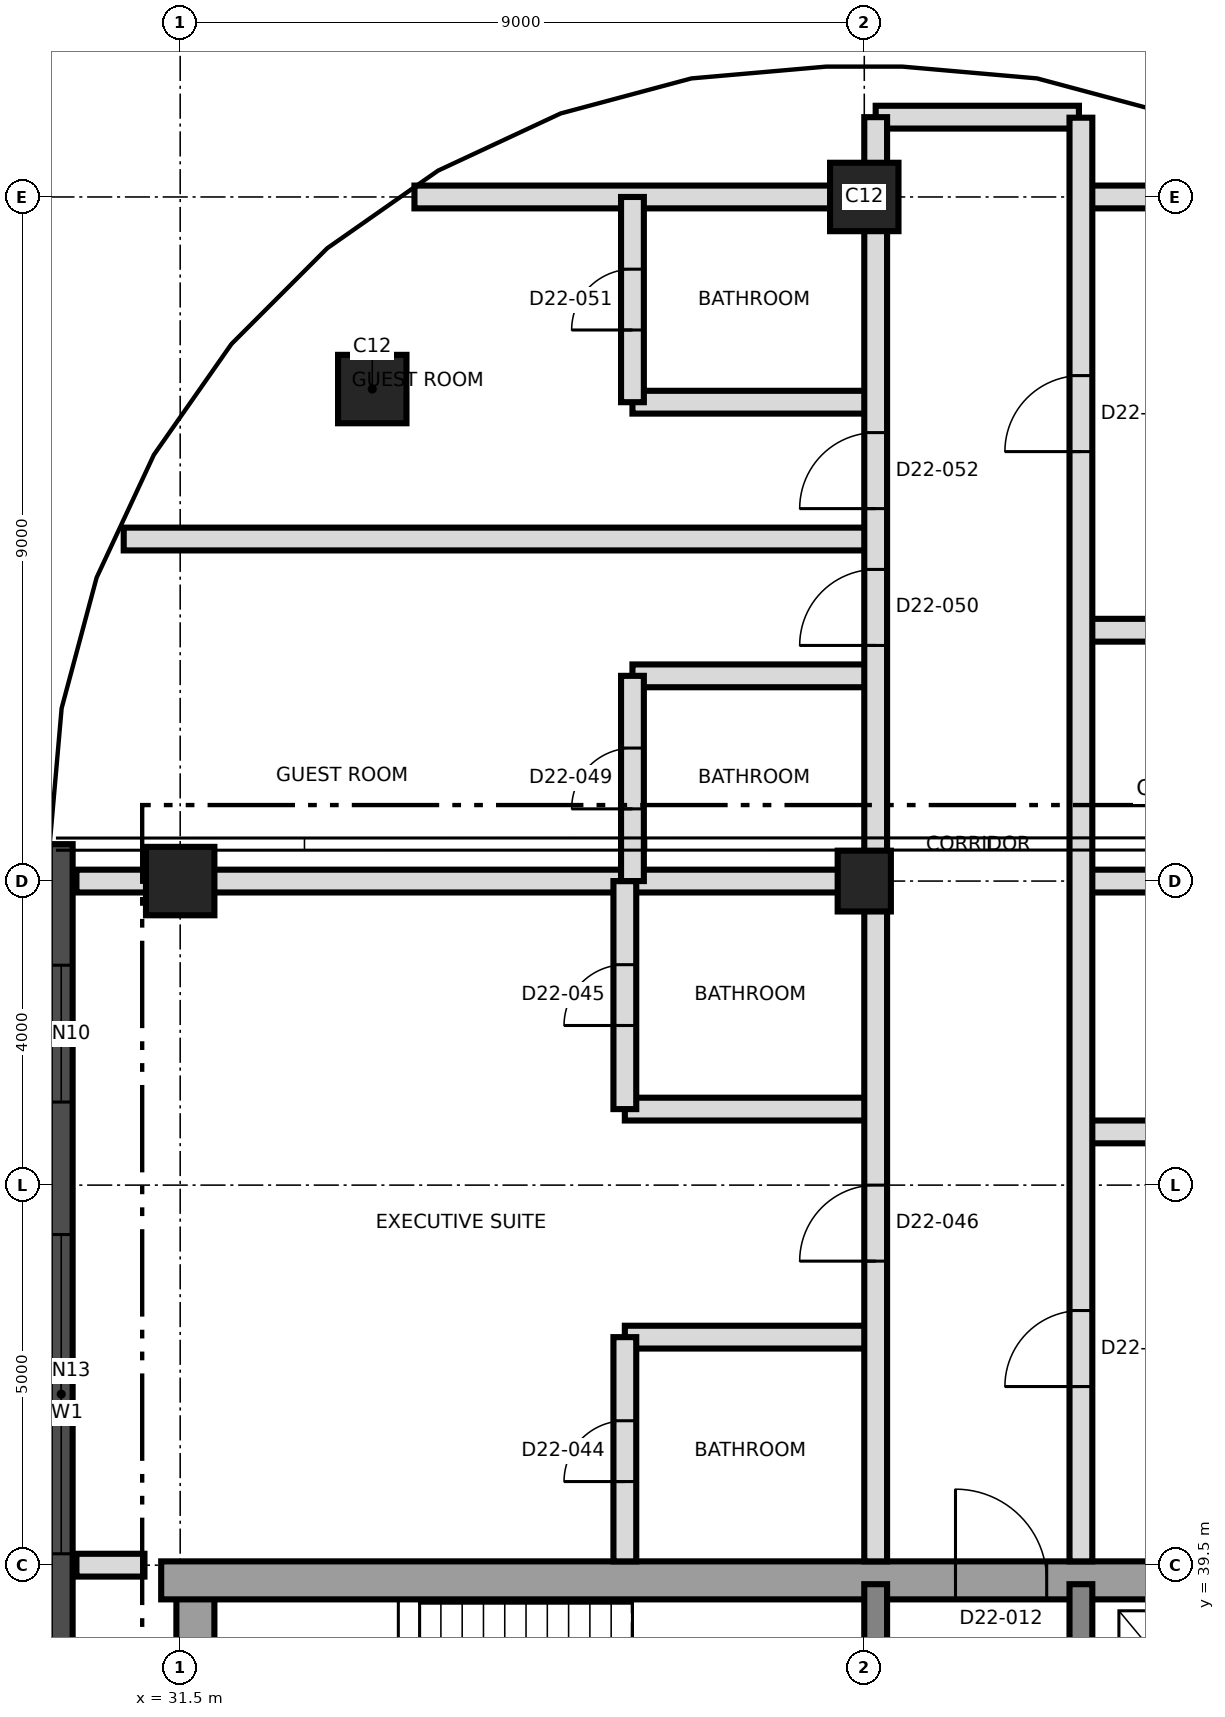
"""IFC4 building model, lengths in metres.
Left out: names, types, materials, properties, quantities, classifications, styles, units other than length and angle.
Written with IfcOpenShell. Run it as: python <this file> out.ifc"""

import sys

from ifc_helpers import new_model, si_unit, direction, frame, frame_2d, origin, origin_2d, place, context, subcontext, project, spatial, rectangle, extrude, element, fill, save


model = new_model("IFC4")
c1 = context("Model", 3, precision=1e-05, world=origin(), true_north=direction((0.0, 1.0)))
c2 = subcontext(c1, "Body", "Model", "MODEL_VIEW")
j1 = project(units=[si_unit("LENGTHUNIT", "METRE"), si_unit("PLANEANGLEUNIT", "RADIAN")], contexts=[c1])
p1 = place(None, origin())
s1 = spatial("IfcSite", under=j1, at=p1, CompositionType="ELEMENT")
p2 = place(p1, origin())
s2 = spatial("IfcBuilding", under=s1, at=p2, CompositionType="ELEMENT")
p3 = place(p2, frame((0.0, 0.0, 203.2)))
s3 = spatial("IfcBuildingStorey", under=s2, at=p3, CompositionType="ELEMENT", Elevation=203.2)
p4 = place(p3, frame((31.7, 21.75, 0.0), z_axis=(0.0, 0.0, 1.0), x_axis=(0.0, 1.0, 0.0)))
e1 = element("IfcWall", 1, at=p4, inside=s3, PredefinedType="SHEAR", context=c2, shape_type="SweptSolid", body=[
    extrude(rectangle(XDim=17.5, YDim=0.5, at=frame_2d((8.75, 0.0))), origin(), (0.0, 0.0, 1.0), 3.7),
])
p5 = place(p3, frame((31.25, 39.3, 0.0), z_axis=(0.0, 0.0, 1.0), x_axis=(1.0, 0.0, 0.0)))
e2 = element("IfcWall", 2, at=p5, inside=s3, PredefinedType="SHEAR", context=c2, shape_type="SweptSolid", body=[
    extrude(rectangle(XDim=27.0, YDim=0.5, at=frame_2d((13.5, 0.0))), origin(), (0.0, 0.0, 1.0), 3.7),
])
p6 = place(p5, frame((10.45, 0.0, 0.0)))
e3 = element("IfcOpeningElement", 3, at=p6, cuts=e2, PredefinedType="OPENING", context=c2, shape_type="SweptSolid", body=[
    extrude(rectangle(XDim=1.2, YDim=2.1, at=frame_2d((0.6, 1.05))), frame((0.0, 0.26, 0.0), z_axis=(0.0, -1.0, 0.0), x_axis=(1.0, 0.0, 0.0)), (0.0, 0.0, 1.0), 0.52),
])
for number, where, z_axis, x_axis in (
    (4, (40.65, 33.5, 0.0), (0.0, 0.0, 1.0), (0.0, 1.0, 0.0)),
    (5, (43.35, 33.5, 0.0), (0.0, 0.0, 1.0), (0.0, 1.0, 0.0)),
):
    element("IfcWall", number, at=place(p3, frame(where, z_axis=z_axis, x_axis=x_axis)), inside=s3, PredefinedType="SHEAR", context=c2, shape_type="SweptSolid", body=[
        extrude(rectangle(XDim=5.75, YDim=0.3, at=frame_2d((2.875, 0.0))), origin(), (0.0, 0.0, 1.0), 3.7),
    ])
p7 = place(p3, frame((31.5, 48.5, 0.0), z_axis=(0.0, 0.0, 1.0), x_axis=(1.0, 0.0, 0.0)))
e6 = element("IfcColumn", 6, at=p7, inside=s3, PredefinedType="COLUMN", context=c2, shape_type="SweptSolid", body=[
    extrude(rectangle(XDim=0.9, YDim=0.9, at=origin_2d()), origin(), (0.0, 0.0, 1.0), 3.7),
])
p8 = place(p3, frame((40.5, 48.5, 0.0), z_axis=(0.0, 0.0, 1.0), x_axis=(0.0, 1.0, 0.0)))
e7 = element("IfcColumn", 7, at=p8, inside=s3, PredefinedType="COLUMN", context=c2, shape_type="SweptSolid", body=[
    extrude(rectangle(XDim=0.8, YDim=0.7, at=origin_2d()), origin(), (0.0, 0.0, 1.0), 3.7),
])
for number, where, z_axis, x_axis in (
    (8, (34.027, 54.973, 0.0), (0.0, 0.0, 1.0), (1.0, 0.0, 0.0)),
    (9, (40.5, 57.5, 0.0), (0.0, 0.0, 1.0), (1.0, 0.0, 0.0)),
):
    element("IfcColumn", number, at=place(p3, frame(where, z_axis=z_axis, x_axis=x_axis)), inside=s3, PredefinedType="COLUMN", context=c2, shape_type="SweptSolid", body=[
        extrude(rectangle(XDim=0.9, YDim=0.9, at=origin_2d()), origin(), (0.0, 0.0, 1.0), 3.7),
    ])
p9 = place(p3, frame((29.935, 48.986, 0.0), z_axis=(0.0, 0.0, 1.0), x_axis=(0.0, -1.0, 0.0)))
e10 = element("IfcWall", 10, at=p9, inside=s3, PredefinedType="SOLIDWALL", context=c2, shape_type="SweptSolid", body=[
    extrude(rectangle(XDim=14.976, YDim=0.3, at=frame_2d((7.488, 0.0))), origin(), (0.0, 0.0, 1.0), 3.4),
])
p10 = place(p9, frame((1.593, 0.0, 0.3)))
e11 = element("IfcOpeningElement", 11, at=p10, cuts=e10, PredefinedType="OPENING", context=c2, shape_type="SweptSolid", body=[
    extrude(rectangle(XDim=1.8, YDim=2.4, at=frame_2d((0.9, 1.2))), frame((0.0, 0.16, 0.0), z_axis=(0.0, -1.0, 0.0), x_axis=(1.0, 0.0, 0.0)), (0.0, 0.0, 1.0), 0.32),
])
p11 = place(p9, frame((5.136, 0.0, 0.9)))
e12 = element("IfcOpeningElement", 12, at=p11, cuts=e10, PredefinedType="OPENING", context=c2, shape_type="SweptSolid", body=[
    extrude(rectangle(XDim=4.2, YDim=1.7, at=frame_2d((2.1, 0.85))), frame((0.0, 0.16, 0.0), z_axis=(0.0, -1.0, 0.0), x_axis=(1.0, 0.0, 0.0)), (0.0, 0.0, 1.0), 0.32),
])
p12 = place(p9, frame((11.331, 0.0, 0.3)))
e13 = element("IfcOpeningElement", 13, at=p12, cuts=e10, PredefinedType="OPENING", context=c2, shape_type="SweptSolid", body=[
    extrude(rectangle(XDim=1.8, YDim=2.4, at=frame_2d((0.9, 1.2))), frame((0.0, 0.16, 0.0), z_axis=(0.0, -1.0, 0.0), x_axis=(1.0, 0.0, 0.0)), (0.0, 0.0, 1.0), 0.32),
])
p13 = place(p3, frame((30.135, 39.5, 0.0), z_axis=(0.0, 0.0, 1.0), x_axis=(1.0, 0.0, 0.0)))
e14 = element("IfcWall", 14, at=p13, inside=s3, PredefinedType="PARTITIONING", context=c2, shape_type="SweptSolid", body=[
    extrude(rectangle(XDim=0.895, YDim=0.3, at=frame_2d((0.448, 0.0))), origin(), (0.0, 0.0, 1.0), 3.35),
])
p14 = place(p3, frame((37.35, 42.5, 0.0), z_axis=(0.0, 0.0, 1.0), x_axis=(1.0, 0.0, 0.0)))
e15 = element("IfcWall", 15, at=p14, inside=s3, PredefinedType="PARTITIONING", context=c2, shape_type="SweptSolid", body=[
    extrude(rectangle(XDim=3.3, YDim=0.3, at=frame_2d((1.65, 0.0))), origin(), (0.0, 0.0, 1.0), 3.4),
])
p15 = place(p3, frame((43.35, 45.2, 0.0), z_axis=(0.0, 0.0, 1.0), x_axis=(1.0, 0.0, 0.0)))
e16 = element("IfcWall", 16, at=p15, inside=s3, PredefinedType="PARTITIONING", context=c2, shape_type="SweptSolid", body=[
    extrude(rectangle(XDim=3.5, YDim=0.3, at=frame_2d((1.75, 0.0))), origin(), (0.0, 0.0, 1.0), 3.4),
])
p16 = place(p3, frame((37.35, 45.5, 0.0), z_axis=(0.0, 0.0, 1.0), x_axis=(1.0, 0.0, 0.0)))
e17 = element("IfcWall", 17, at=p16, inside=s3, PredefinedType="PARTITIONING", context=c2, shape_type="SweptSolid", body=[
    extrude(rectangle(XDim=3.3, YDim=0.3, at=frame_2d((1.65, 0.0))), origin(), (0.0, 0.0, 1.0), 3.4),
])
p17 = place(p3, frame((30.135, 48.5, 0.0), z_axis=(0.0, 0.0, 1.0), x_axis=(1.0, 0.0, 0.0)))
e18 = element("IfcWall", 18, at=p17, inside=s3, PredefinedType="PARTITIONING", context=c2, shape_type="SweptSolid", body=[
    extrude(rectangle(XDim=10.515, YDim=0.3, at=frame_2d((5.257, 0.0))), origin(), (0.0, 0.0, 1.0), 3.35),
])
p18 = place(p3, frame((43.35, 48.5, 0.0), z_axis=(0.0, 0.0, 1.0), x_axis=(1.0, 0.0, 0.0)))
e19 = element("IfcWall", 19, at=p18, inside=s3, PredefinedType="PARTITIONING", context=c2, shape_type="SweptSolid", body=[
    extrude(rectangle(XDim=7.695, YDim=0.3, at=frame_2d((3.847, 0.0))), origin(), (0.0, 0.0, 1.0), 3.35),
])
p19 = place(p3, frame((37.45, 51.2, 0.0), z_axis=(0.0, 0.0, 1.0), x_axis=(1.0, 0.0, 0.0)))
e20 = element("IfcWall", 20, at=p19, inside=s3, PredefinedType="PARTITIONING", context=c2, shape_type="SweptSolid", body=[
    extrude(rectangle(XDim=3.2, YDim=0.3, at=frame_2d((1.6, 0.0))), origin(), (0.0, 0.0, 1.0), 3.4),
])
p20 = place(p3, frame((43.35, 51.8, 0.0), z_axis=(0.0, 0.0, 1.0), x_axis=(1.0, 0.0, 0.0)))
e21 = element("IfcWall", 21, at=p20, inside=s3, PredefinedType="PARTITIONING", context=c2, shape_type="SweptSolid", body=[
    extrude(rectangle(XDim=3.5, YDim=0.3, at=frame_2d((1.75, 0.0))), origin(), (0.0, 0.0, 1.0), 3.4),
])
p21 = place(p3, frame((30.757, 53.0, 0.0), z_axis=(0.0, 0.0, 1.0), x_axis=(1.0, 0.0, 0.0)))
e22 = element("IfcWall", 22, at=p21, inside=s3, PredefinedType="PARTITIONING", context=c2, shape_type="SweptSolid", body=[
    extrude(rectangle(XDim=9.893, YDim=0.3, at=frame_2d((4.946, 0.0))), origin(), (0.0, 0.0, 1.0), 3.35),
])
p22 = place(p3, frame((37.45, 54.8, 0.0), z_axis=(0.0, 0.0, 1.0), x_axis=(1.0, 0.0, 0.0)))
e23 = element("IfcWall", 23, at=p22, inside=s3, PredefinedType="PARTITIONING", context=c2, shape_type="SweptSolid", body=[
    extrude(rectangle(XDim=3.2, YDim=0.3, at=frame_2d((1.6, 0.0))), origin(), (0.0, 0.0, 1.0), 3.4),
])
p23 = place(p3, frame((34.582, 57.5, 0.0), z_axis=(0.0, 0.0, 1.0), x_axis=(1.0, 0.0, 0.0)))
e24 = element("IfcWall", 24, at=p23, inside=s3, PredefinedType="PARTITIONING", context=c2, shape_type="SweptSolid", body=[
    extrude(rectangle(XDim=6.068, YDim=0.3, at=frame_2d((3.034, 0.0))), origin(), (0.0, 0.0, 1.0), 3.35),
])
p24 = place(p3, frame((43.35, 57.5, 0.0), z_axis=(0.0, 0.0, 1.0), x_axis=(1.0, 0.0, 0.0)))
e25 = element("IfcWall", 25, at=p24, inside=s3, PredefinedType="PARTITIONING", context=c2, shape_type="SweptSolid", body=[
    extrude(rectangle(XDim=3.068, YDim=0.3, at=frame_2d((1.534, 0.0))), origin(), (0.0, 0.0, 1.0), 3.35),
])
p25 = place(p3, frame((40.65, 58.55, 0.0), z_axis=(0.0, 0.0, 1.0), x_axis=(1.0, 0.0, 0.0)))
e26 = element("IfcWall", 26, at=p25, inside=s3, PredefinedType="PARTITIONING", context=c2, shape_type="SweptSolid", body=[
    extrude(rectangle(XDim=2.674, YDim=0.3, at=frame_2d((1.337, 0.0))), origin(), (0.0, 0.0, 1.0), 3.35),
])
p26 = place(p3, frame((37.35, 39.55, 0.0), z_axis=(0.0, 0.0, 1.0), x_axis=(0.0, 1.0, 0.0)))
e27 = element("IfcWall", 27, at=p26, inside=s3, PredefinedType="PARTITIONING", context=c2, shape_type="SweptSolid", body=[
    extrude(rectangle(XDim=2.95, YDim=0.3, at=frame_2d((1.475, 0.0))), origin(), (0.0, 0.0, 1.0), 3.4),
])
p27 = place(p26, frame((1.05, 0.0, 0.0)))
e28 = element("IfcOpeningElement", 28, at=p27, cuts=e27, PredefinedType="OPENING", context=c2, shape_type="SweptSolid", body=[
    extrude(rectangle(XDim=0.8, YDim=2.1, at=frame_2d((0.4, 1.05))), frame((0.0, 0.16, 0.0), z_axis=(0.0, -1.0, 0.0), x_axis=(1.0, 0.0, 0.0)), (0.0, 0.0, 1.0), 0.32),
])
p28 = place(p3, frame((37.35, 45.5, 0.0), z_axis=(0.0, 0.0, 1.0), x_axis=(0.0, 1.0, 0.0)))
e29 = element("IfcWall", 29, at=p28, inside=s3, PredefinedType="PARTITIONING", context=c2, shape_type="SweptSolid", body=[
    extrude(rectangle(XDim=3.0, YDim=0.3, at=frame_2d((1.5, 0.0))), origin(), (0.0, 0.0, 1.0), 3.4),
])
p29 = place(p28, frame((1.1, 0.0, 0.0)))
e30 = element("IfcOpeningElement", 30, at=p29, cuts=e29, PredefinedType="OPENING", context=c2, shape_type="SweptSolid", body=[
    extrude(rectangle(XDim=0.8, YDim=2.1, at=frame_2d((0.4, 1.05))), frame((0.0, 0.16, 0.0), z_axis=(0.0, -1.0, 0.0), x_axis=(1.0, 0.0, 0.0)), (0.0, 0.0, 1.0), 0.32),
])
p30 = place(p3, frame((37.45, 48.5, 0.0), z_axis=(0.0, 0.0, 1.0), x_axis=(0.0, 1.0, 0.0)))
e31 = element("IfcWall", 31, at=p30, inside=s3, PredefinedType="PARTITIONING", context=c2, shape_type="SweptSolid", body=[
    extrude(rectangle(XDim=2.7, YDim=0.3, at=frame_2d((1.35, 0.0))), origin(), (0.0, 0.0, 1.0), 3.4),
])
p31 = place(p30, frame((0.95, 0.0, 0.0)))
e32 = element("IfcOpeningElement", 32, at=p31, cuts=e31, PredefinedType="OPENING", context=c2, shape_type="SweptSolid", body=[
    extrude(rectangle(XDim=0.8, YDim=2.1, at=frame_2d((0.4, 1.05))), frame((0.0, 0.16, 0.0), z_axis=(0.0, -1.0, 0.0), x_axis=(1.0, 0.0, 0.0)), (0.0, 0.0, 1.0), 0.32),
])
p32 = place(p3, frame((37.45, 54.8, 0.0), z_axis=(0.0, 0.0, 1.0), x_axis=(0.0, 1.0, 0.0)))
e33 = element("IfcWall", 33, at=p32, inside=s3, PredefinedType="PARTITIONING", context=c2, shape_type="SweptSolid", body=[
    extrude(rectangle(XDim=2.7, YDim=0.3, at=frame_2d((1.35, 0.0))), origin(), (0.0, 0.0, 1.0), 3.4),
])
p33 = place(p32, frame((0.95, 0.0, 0.0)))
e34 = element("IfcOpeningElement", 34, at=p33, cuts=e33, PredefinedType="OPENING", context=c2, shape_type="SweptSolid", body=[
    extrude(rectangle(XDim=0.8, YDim=2.1, at=frame_2d((0.4, 1.05))), frame((0.0, 0.16, 0.0), z_axis=(0.0, -1.0, 0.0), x_axis=(1.0, 0.0, 0.0)), (0.0, 0.0, 1.0), 0.32),
])
p34 = place(p3, frame((40.65, 39.55, 0.0), z_axis=(0.0, 0.0, 1.0), x_axis=(0.0, 1.0, 0.0)))
e35 = element("IfcWall", 35, at=p34, inside=s3, PredefinedType="PARTITIONING", context=c2, shape_type="SweptSolid", body=[
    extrude(rectangle(XDim=19.0, YDim=0.3, at=frame_2d((9.5, 0.0))), origin(), (0.0, 0.0, 1.0), 3.35),
])
p35 = place(p34, frame((3.95, 0.0, 0.0)))
e36 = element("IfcOpeningElement", 36, at=p35, cuts=e35, PredefinedType="OPENING", context=c2, shape_type="SweptSolid", body=[
    extrude(rectangle(XDim=1.0, YDim=2.4, at=frame_2d((0.5, 1.2))), frame((0.0, 0.16, 0.0), z_axis=(0.0, -1.0, 0.0), x_axis=(1.0, 0.0, 0.0)), (0.0, 0.0, 1.0), 0.32),
])
p36 = place(p34, frame((12.05, 0.0, 0.0)))
e37 = element("IfcOpeningElement", 37, at=p36, cuts=e35, PredefinedType="OPENING", context=c2, shape_type="SweptSolid", body=[
    extrude(rectangle(XDim=1.0, YDim=2.1, at=frame_2d((0.5, 1.05))), frame((0.0, 0.16, 0.0), z_axis=(0.0, -1.0, 0.0), x_axis=(1.0, 0.0, 0.0)), (0.0, 0.0, 1.0), 0.32),
])
p37 = place(p34, frame((13.85, 0.0, 0.0)))
e38 = element("IfcOpeningElement", 38, at=p37, cuts=e35, PredefinedType="OPENING", context=c2, shape_type="SweptSolid", body=[
    extrude(rectangle(XDim=1.0, YDim=2.1, at=frame_2d((0.5, 1.05))), frame((0.0, 0.16, 0.0), z_axis=(0.0, -1.0, 0.0), x_axis=(1.0, 0.0, 0.0)), (0.0, 0.0, 1.0), 0.32),
])
p38 = place(p3, frame((43.35, 39.55, 0.0), z_axis=(0.0, 0.0, 1.0), x_axis=(0.0, 1.0, 0.0)))
e39 = element("IfcWall", 39, at=p38, inside=s3, PredefinedType="PARTITIONING", context=c2, shape_type="SweptSolid", body=[
    extrude(rectangle(XDim=18.993, YDim=0.3, at=frame_2d((9.497, 0.0))), origin(), (0.0, 0.0, 1.0), 3.35),
])
p39 = place(p38, frame((2.3, 0.0, 0.0)))
e40 = element("IfcOpeningElement", 40, at=p39, cuts=e39, PredefinedType="OPENING", context=c2, shape_type="SweptSolid", body=[
    extrude(rectangle(XDim=1.0, YDim=2.4, at=frame_2d((0.5, 1.2))), frame((0.0, 0.16, 0.0), z_axis=(0.0, -1.0, 0.0), x_axis=(1.0, 0.0, 0.0)), (0.0, 0.0, 1.0), 0.32),
])
p40 = place(p38, frame((14.6, 0.0, 0.0)))
e41 = element("IfcOpeningElement", 41, at=p40, cuts=e39, PredefinedType="OPENING", context=c2, shape_type="SweptSolid", body=[
    extrude(rectangle(XDim=1.0, YDim=2.4, at=frame_2d((0.5, 1.2))), frame((0.0, 0.16, 0.0), z_axis=(0.0, -1.0, 0.0), x_axis=(1.0, 0.0, 0.0)), (0.0, 0.0, 1.0), 0.32),
])
p41 = place(p10, origin())
e42 = element("IfcWindow", 42, at=p41, inside=s3, PartitioningType="SINGLE_PANEL", PredefinedType="WINDOW", context=c2, shape_type="SweptSolid", body=[
    extrude(rectangle(XDim=1.8, YDim=2.4, at=frame_2d((0.9, 1.2))), frame((0.0, 0.03, 0.0), z_axis=(0.0, -1.0, 0.0), x_axis=(1.0, 0.0, 0.0)), (0.0, 0.0, 1.0), 0.06),
])
fill(e11, e42)
p42 = place(p11, origin())
e43 = element("IfcWindow", 43, at=p42, inside=s3, PartitioningType="SINGLE_PANEL", PredefinedType="WINDOW", context=c2, shape_type="SweptSolid", body=[
    extrude(rectangle(XDim=4.2, YDim=1.7, at=frame_2d((2.1, 0.85))), frame((0.0, 0.03, 0.0), z_axis=(0.0, -1.0, 0.0), x_axis=(1.0, 0.0, 0.0)), (0.0, 0.0, 1.0), 0.06),
])
fill(e12, e43)
p43 = place(p6, origin())
e44 = element("IfcDoor", 44, at=p43, inside=s3, OperationType="SINGLE_SWING_RIGHT", PredefinedType="DOOR", context=c2, shape_type="SweptSolid", body=[
    extrude(rectangle(XDim=1.2, YDim=2.1, at=frame_2d((0.6, 1.05))), frame((0.0, 0.025, 0.0), z_axis=(0.0, -1.0, 0.0), x_axis=(1.0, 0.0, 0.0)), (0.0, 0.0, 1.0), 0.05),
])
fill(e3, e44)
p44 = place(p39, origin())
e45 = element("IfcDoor", 45, at=p44, inside=s3, OperationType="SINGLE_SWING_LEFT", PredefinedType="DOOR", context=c2, shape_type="SweptSolid", body=[
    extrude(rectangle(XDim=1.0, YDim=2.4, at=frame_2d((0.5, 1.2))), frame((0.0, 0.025, 0.0), z_axis=(0.0, -1.0, 0.0), x_axis=(1.0, 0.0, 0.0)), (0.0, 0.0, 1.0), 0.05),
])
fill(e40, e45)
p45 = place(p27, origin())
e46 = element("IfcDoor", 46, at=p45, inside=s3, OperationType="SINGLE_SWING_LEFT", PredefinedType="DOOR", context=c2, shape_type="SweptSolid", body=[
    extrude(rectangle(XDim=0.8, YDim=2.1, at=frame_2d((0.4, 1.05))), frame((0.0, 0.025, 0.0), z_axis=(0.0, -1.0, 0.0), x_axis=(1.0, 0.0, 0.0)), (0.0, 0.0, 1.0), 0.05),
])
fill(e28, e46)
p46 = place(p29, origin())
e47 = element("IfcDoor", 47, at=p46, inside=s3, OperationType="SINGLE_SWING_RIGHT", PredefinedType="DOOR", context=c2, shape_type="SweptSolid", body=[
    extrude(rectangle(XDim=0.8, YDim=2.1, at=frame_2d((0.4, 1.05))), frame((0.0, 0.025, 0.0), z_axis=(0.0, -1.0, 0.0), x_axis=(1.0, 0.0, 0.0)), (0.0, 0.0, 1.0), 0.05),
])
fill(e30, e47)
p47 = place(p35, origin())
e48 = element("IfcDoor", 48, at=p47, inside=s3, OperationType="SINGLE_SWING_LEFT", PredefinedType="DOOR", context=c2, shape_type="SweptSolid", body=[
    extrude(rectangle(XDim=1.0, YDim=2.4, at=frame_2d((0.5, 1.2))), frame((0.0, 0.025, 0.0), z_axis=(0.0, -1.0, 0.0), x_axis=(1.0, 0.0, 0.0)), (0.0, 0.0, 1.0), 0.05),
])
fill(e36, e48)
p48 = place(p40, origin())
e49 = element("IfcDoor", 49, at=p48, inside=s3, OperationType="SINGLE_SWING_LEFT", PredefinedType="DOOR", context=c2, shape_type="SweptSolid", body=[
    extrude(rectangle(XDim=1.0, YDim=2.4, at=frame_2d((0.5, 1.2))), frame((0.0, 0.025, 0.0), z_axis=(0.0, -1.0, 0.0), x_axis=(1.0, 0.0, 0.0)), (0.0, 0.0, 1.0), 0.05),
])
fill(e41, e49)
p49 = place(p31, origin())
e50 = element("IfcDoor", 50, at=p49, inside=s3, OperationType="SINGLE_SWING_LEFT", PredefinedType="DOOR", context=c2, shape_type="SweptSolid", body=[
    extrude(rectangle(XDim=0.8, YDim=2.1, at=frame_2d((0.4, 1.05))), frame((0.0, 0.025, 0.0), z_axis=(0.0, -1.0, 0.0), x_axis=(1.0, 0.0, 0.0)), (0.0, 0.0, 1.0), 0.05),
])
fill(e32, e50)
p50 = place(p36, origin())
e51 = element("IfcDoor", 51, at=p50, inside=s3, OperationType="SINGLE_SWING_RIGHT", PredefinedType="DOOR", context=c2, shape_type="SweptSolid", body=[
    extrude(rectangle(XDim=1.0, YDim=2.1, at=frame_2d((0.5, 1.05))), frame((0.0, 0.025, 0.0), z_axis=(0.0, -1.0, 0.0), x_axis=(1.0, 0.0, 0.0)), (0.0, 0.0, 1.0), 0.05),
])
fill(e37, e51)
p51 = place(p33, origin())
e52 = element("IfcDoor", 52, at=p51, inside=s3, OperationType="SINGLE_SWING_RIGHT", PredefinedType="DOOR", context=c2, shape_type="SweptSolid", body=[
    extrude(rectangle(XDim=0.8, YDim=2.1, at=frame_2d((0.4, 1.05))), frame((0.0, 0.025, 0.0), z_axis=(0.0, -1.0, 0.0), x_axis=(1.0, 0.0, 0.0)), (0.0, 0.0, 1.0), 0.05),
])
fill(e34, e52)
p52 = place(p37, origin())
e53 = element("IfcDoor", 53, at=p52, inside=s3, OperationType="SINGLE_SWING_LEFT", PredefinedType="DOOR", context=c2, shape_type="SweptSolid", body=[
    extrude(rectangle(XDim=1.0, YDim=2.1, at=frame_2d((0.5, 1.05))), frame((0.0, 0.025, 0.0), z_axis=(0.0, -1.0, 0.0), x_axis=(1.0, 0.0, 0.0)), (0.0, 0.0, 1.0), 0.05),
])
fill(e38, e53)
save(model, sys.argv[1])
